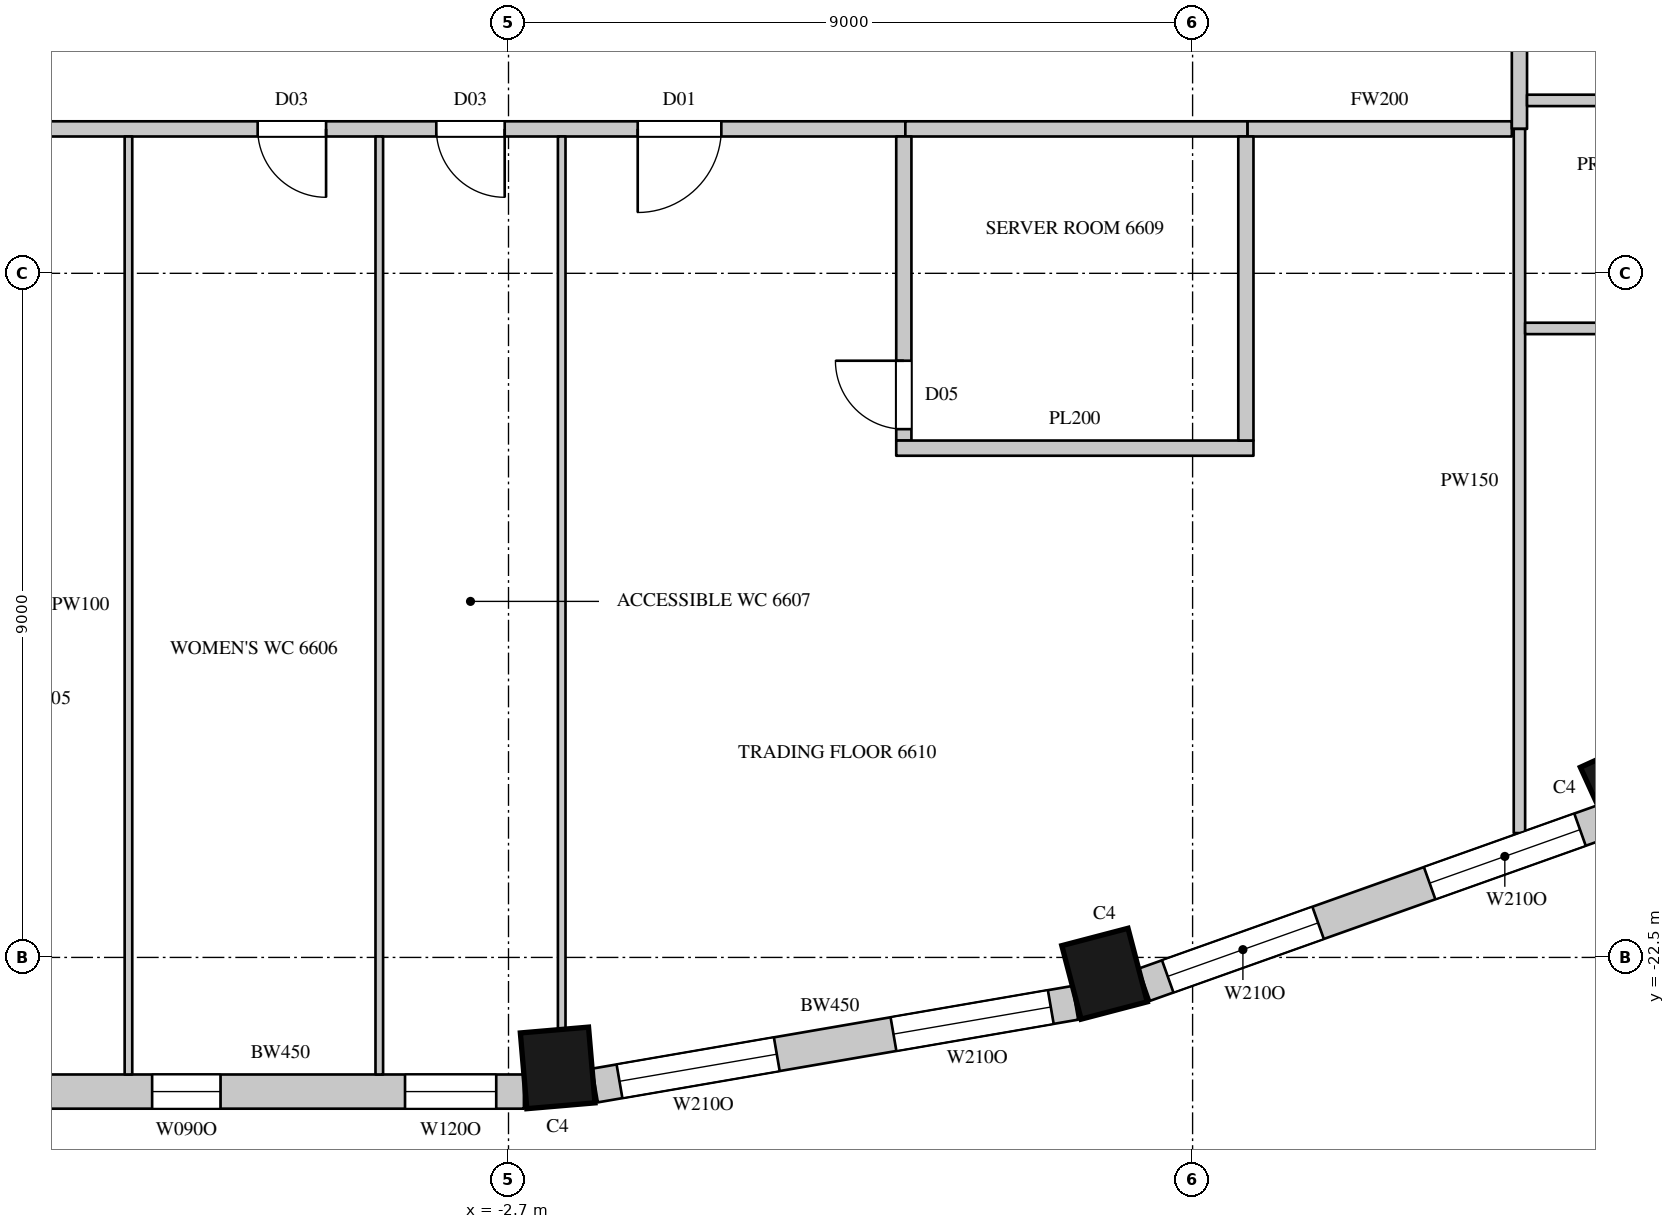
"""IFC4 building model, lengths in metres.
Left out: names, types, materials, properties, quantities, classifications, styles, units other than length and angle.
Written with IfcOpenShell. Run it as: python <this file> out.ifc"""

import sys

from ifc_helpers import new_model, si_unit, direction, frame, frame_2d, origin, origin_2d, place, context, subcontext, project, spatial, rectangle, extrude, element, fill, save


model = new_model("IFC4")
c1 = context("Model", 3, precision=1e-05, world=origin(), true_north=direction((0.0, 1.0)))
c2 = subcontext(c1, "Body", "Model", "MODEL_VIEW")
j1 = project(units=[si_unit("LENGTHUNIT", "METRE"), si_unit("PLANEANGLEUNIT", "RADIAN")], contexts=[c1])
p1 = place(None, origin())
s1 = spatial("IfcSite", under=j1, at=p1, CompositionType="ELEMENT")
p2 = place(p1, origin())
s2 = spatial("IfcBuilding", under=s1, at=p2, CompositionType="ELEMENT")
p3 = place(p2, frame((0.0, 0.0, 292.6)))
s3 = spatial("IfcBuildingStorey", under=s2, at=p3, CompositionType="ELEMENT", Elevation=292.6)
for number, where, z_axis, x_axis in (
    (1, (-2.053, -23.954, 0.0), (0.0, 0.0, 1.0), (0.996, 0.085, 0.0)),
    (2, (5.142, -22.715, 0.0), (0.0, 0.0, 1.0), (0.967, 0.253, 0.0)),
    (3, (12.019, -20.267, 0.0), (0.0, 0.0, 1.0), (0.91, 0.415, 0.0)),
):
    element("IfcColumn", number, at=place(p3, frame(where, z_axis=z_axis, x_axis=x_axis)), inside=s3, PredefinedType="COLUMN", context=c2, shape_type="SweptSolid", body=[
        extrude(rectangle(XDim=0.9, YDim=1.0, at=origin_2d()), origin(), (0.0, 0.0, 1.0), 4.1),
    ])
p4 = place(p3, frame((-8.903, -24.265, 0.0), z_axis=(0.0, 0.0, 1.0), x_axis=(1.0, 0.0, 0.0)))
e4 = element("IfcWall", 4, at=p4, inside=s3, PredefinedType="SOLIDWALL", context=c2, shape_type="SweptSolid", body=[
    extrude(rectangle(XDim=6.406, YDim=0.45, at=frame_2d((3.203, 0.0))), origin(), (0.0, 0.0, 1.0), 3.8),
])
p5 = place(p4, frame((1.514, 0.0, 1.05)))
e5 = element("IfcOpeningElement", 5, at=p5, cuts=e4, PredefinedType="OPENING", context=c2, shape_type="SweptSolid", body=[
    extrude(rectangle(XDim=0.9, YDim=2.4, at=frame_2d((0.45, 1.2))), frame((0.0, 0.235, 0.0), z_axis=(0.0, -1.0, 0.0), x_axis=(1.0, 0.0, 0.0)), (0.0, 0.0, 1.0), 0.47),
])
p6 = place(p4, frame((4.841, 0.0, 1.05)))
e6 = element("IfcOpeningElement", 6, at=p6, cuts=e4, PredefinedType="OPENING", context=c2, shape_type="SweptSolid", body=[
    extrude(rectangle(XDim=1.2, YDim=2.4, at=frame_2d((0.6, 1.2))), frame((0.0, 0.235, 0.0), z_axis=(0.0, -1.0, 0.0), x_axis=(1.0, 0.0, 0.0)), (0.0, 0.0, 1.0), 0.47),
])
p7 = place(p3, frame((-1.562, -24.185, 0.0), z_axis=(0.0, 0.0, 1.0), x_axis=(0.985502073964, 0.169663379113, 0.0)))
e7 = element("IfcWall", 7, at=p7, inside=s3, PredefinedType="SOLIDWALL", context=c2, shape_type="SweptSolid", body=[
    extrude(rectangle(XDim=6.412, YDim=0.45, at=frame_2d((3.206, 0.0))), origin(), (0.0, 0.0, 1.0), 3.8),
])
p8 = place(p7, frame((0.327, 0.0, 1.05)))
e8 = element("IfcOpeningElement", 8, at=p8, cuts=e7, PredefinedType="OPENING", context=c2, shape_type="SweptSolid", body=[
    extrude(rectangle(XDim=2.1, YDim=2.4, at=frame_2d((1.05, 1.2))), frame((0.0, 0.235, 0.0), z_axis=(0.0, -1.0, 0.0), x_axis=(1.0, 0.0, 0.0)), (0.0, 0.0, 1.0), 0.47),
])
p9 = place(p7, frame((3.985, 0.0, 1.05)))
e9 = element("IfcOpeningElement", 9, at=p9, cuts=e7, PredefinedType="OPENING", context=c2, shape_type="SweptSolid", body=[
    extrude(rectangle(XDim=2.1, YDim=2.4, at=frame_2d((1.05, 1.2))), frame((0.0, 0.235, 0.0), z_axis=(0.0, -1.0, 0.0), x_axis=(1.0, 0.0, 0.0)), (0.0, 0.0, 1.0), 0.47),
])
p10 = place(p3, frame((5.665, -22.859, 0.0), z_axis=(0.0, 0.0, 1.0), x_axis=(0.942108340262, 0.335308626803, 0.0)))
e10 = element("IfcWall", 10, at=p10, inside=s3, PredefinedType="SOLIDWALL", context=c2, shape_type="SweptSolid", body=[
    extrude(rectangle(XDim=6.412, YDim=0.45, at=frame_2d((3.206, 0.0))), origin(), (0.0, 0.0, 1.0), 3.8),
])
p11 = place(p10, frame((0.327, 0.0, 1.05)))
e11 = element("IfcOpeningElement", 11, at=p11, cuts=e10, PredefinedType="OPENING", context=c2, shape_type="SweptSolid", body=[
    extrude(rectangle(XDim=2.1, YDim=2.4, at=frame_2d((1.05, 1.2))), frame((0.0, 0.235, 0.0), z_axis=(0.0, -1.0, 0.0), x_axis=(1.0, 0.0, 0.0)), (0.0, 0.0, 1.0), 0.47),
])
p12 = place(p10, frame((3.985, 0.0, 1.05)))
e12 = element("IfcOpeningElement", 12, at=p12, cuts=e10, PredefinedType="OPENING", context=c2, shape_type="SweptSolid", body=[
    extrude(rectangle(XDim=2.1, YDim=2.4, at=frame_2d((1.05, 1.2))), frame((0.0, 0.235, 0.0), z_axis=(0.0, -1.0, 0.0), x_axis=(1.0, 0.0, 0.0)), (0.0, 0.0, 1.0), 0.47),
])
p13 = place(p3, frame((-10.9, -11.6, 0.0), z_axis=(0.0, 0.0, 1.0), x_axis=(1.0, 0.0, 0.0)))
e13 = element("IfcWall", 13, at=p13, inside=s3, PredefinedType="PARTITIONING", context=c2, shape_type="SweptSolid", body=[
    extrude(rectangle(XDim=13.421, YDim=0.2, at=frame_2d((6.71, 0.0))), origin(), (0.0, 0.0, 1.0), 3.8),
])
p14 = place(p13, frame((1.1, 0.0, 0.0)))
e14 = element("IfcOpeningElement", 14, at=p14, cuts=e13, PredefinedType="OPENING", context=c2, shape_type="SweptSolid", body=[
    extrude(rectangle(XDim=0.9, YDim=2.2, at=frame_2d((0.45, 1.1))), frame((0.0, 0.11, 0.0), z_axis=(0.0, -1.0, 0.0), x_axis=(1.0, 0.0, 0.0)), (0.0, 0.0, 1.0), 0.22),
])
p15 = place(p13, frame((4.9, 0.0, 0.0)))
e15 = element("IfcOpeningElement", 15, at=p15, cuts=e13, PredefinedType="OPENING", context=c2, shape_type="SweptSolid", body=[
    extrude(rectangle(XDim=0.9, YDim=2.2, at=frame_2d((0.45, 1.1))), frame((0.0, 0.11, 0.0), z_axis=(0.0, -1.0, 0.0), x_axis=(1.0, 0.0, 0.0)), (0.0, 0.0, 1.0), 0.22),
])
p16 = place(p13, frame((7.25, 0.0, 0.0)))
e16 = element("IfcOpeningElement", 16, at=p16, cuts=e13, PredefinedType="OPENING", context=c2, shape_type="SweptSolid", body=[
    extrude(rectangle(XDim=0.9, YDim=2.2, at=frame_2d((0.45, 1.1))), frame((0.0, 0.11, 0.0), z_axis=(0.0, -1.0, 0.0), x_axis=(1.0, 0.0, 0.0)), (0.0, 0.0, 1.0), 0.22),
])
p17 = place(p13, frame((9.9, 0.0, 0.0)))
e17 = element("IfcOpeningElement", 17, at=p17, cuts=e13, PredefinedType="OPENING", context=c2, shape_type="SweptSolid", body=[
    extrude(rectangle(XDim=1.1, YDim=2.4, at=frame_2d((0.55, 1.2))), frame((0.0, 0.11, 0.0), z_axis=(0.0, -1.0, 0.0), x_axis=(1.0, 0.0, 0.0)), (0.0, 0.0, 1.0), 0.22),
])
p18 = place(p3, frame((7.021, -11.6, 0.0), z_axis=(0.0, 0.0, 1.0), x_axis=(1.0, 0.0, 0.0)))
e18 = element("IfcWall", 18, at=p18, inside=s3, PredefinedType="PARTITIONING", context=c2, shape_type="SweptSolid", body=[
    extrude(rectangle(XDim=3.479, YDim=0.2, at=frame_2d((1.74, 0.0))), origin(), (0.0, 0.0, 1.0), 3.8),
])
p19 = place(p3, frame((10.6, -11.6, 0.0), z_axis=(0.0, 0.0, 1.0), x_axis=(0.0, 1.0, 0.0)))
e19 = element("IfcWall", 19, at=p19, inside=s3, PredefinedType="PARTITIONING", context=c2, shape_type="SweptSolid", body=[
    extrude(rectangle(XDim=23.7, YDim=0.2, at=frame_2d((11.85, 0.0))), origin(), (0.0, 0.0, 1.0), 3.8),
])
p20 = place(p19, frame((9.45, 0.0, 0.0)))
e20 = element("IfcOpeningElement", 20, at=p20, cuts=e19, PredefinedType="OPENING", context=c2, shape_type="SweptSolid", body=[
    extrude(rectangle(XDim=1.5, YDim=2.4, at=frame_2d((0.75, 1.2))), frame((0.0, 0.11, 0.0), z_axis=(0.0, -1.0, 0.0), x_axis=(1.0, 0.0, 0.0)), (0.0, 0.0, 1.0), 0.22),
])
p21 = place(p19, frame((19.45, 0.0, 0.0)))
e21 = element("IfcOpeningElement", 21, at=p21, cuts=e19, PredefinedType="OPENING", context=c2, shape_type="SweptSolid", body=[
    extrude(rectangle(XDim=1.1, YDim=2.4, at=frame_2d((0.55, 1.2))), frame((0.0, 0.11, 0.0), z_axis=(0.0, -1.0, 0.0), x_axis=(1.0, 0.0, 0.0)), (0.0, 0.0, 1.0), 0.22),
])
p22 = place(p19, frame((4.6, 0.0, 0.0)))
e22 = element("IfcOpeningElement", 22, at=p22, cuts=e19, PredefinedType="OPENING", context=c2, shape_type="SweptSolid", body=[
    extrude(rectangle(XDim=1.1, YDim=2.4, at=frame_2d((0.55, 1.2))), frame((0.0, 0.11, 0.0), z_axis=(0.0, -1.0, 0.0), x_axis=(1.0, 0.0, 0.0)), (0.0, 0.0, 1.0), 0.22),
])
p23 = place(p3, frame((10.6, -20.864, 0.0), z_axis=(0.0, 0.0, 1.0), x_axis=(0.0, 1.0, 0.0)))
e23 = element("IfcWall", 23, at=p23, inside=s3, PredefinedType="PARTITIONING", context=c2, shape_type="SweptSolid", body=[
    extrude(rectangle(XDim=9.264, YDim=0.15, at=frame_2d((4.632, 0.0))), origin(), (0.0, 0.0, 1.0), 3.8),
])
p24 = place(p3, frame((10.675, -14.225, 0.0), z_axis=(0.0, 0.0, 1.0), x_axis=(1.0, 0.0, 0.0)))
e24 = element("IfcWall", 24, at=p24, inside=s3, PredefinedType="PARTITIONING", context=c2, shape_type="SweptSolid", body=[
    extrude(rectangle(XDim=3.6, YDim=0.15, at=frame_2d((1.8, 0.0))), origin(), (0.0, 0.0, 1.0), 3.8),
])
p25 = place(p24, frame((1.3, 0.0, 0.0)))
e25 = element("IfcOpeningElement", 25, at=p25, cuts=e24, PredefinedType="OPENING", context=c2, shape_type="SweptSolid", body=[
    extrude(rectangle(XDim=0.9, YDim=2.2, at=frame_2d((0.45, 1.1))), frame((0.0, 0.085, 0.0), z_axis=(0.0, -1.0, 0.0), x_axis=(1.0, 0.0, 0.0)), (0.0, 0.0, 1.0), 0.17),
])
p26 = place(p3, frame((10.7, -11.225, 0.0), z_axis=(0.0, 0.0, 1.0), x_axis=(1.0, 0.0, 0.0)))
e26 = element("IfcWall", 26, at=p26, inside=s3, PredefinedType="PARTITIONING", context=c2, shape_type="SweptSolid", body=[
    extrude(rectangle(XDim=3.425, YDim=0.15, at=frame_2d((1.712, 0.0))), origin(), (0.0, 0.0, 1.0), 3.8),
])
p27 = place(p3, frame((2.521, -11.6, 0.0), z_axis=(0.0, 0.0, 1.0), x_axis=(1.0, 0.0, 0.0)))
e27 = element("IfcWall", 27, at=p27, inside=s3, PredefinedType="PARTITIONING", context=c2, shape_type="SweptSolid", body=[
    extrude(rectangle(XDim=4.5, YDim=0.2, at=frame_2d((2.25, 0.0))), origin(), (0.0, 0.0, 1.0), 3.8),
])
p28 = place(p3, frame((2.501, -15.7, 0.0), z_axis=(0.0, 0.0, 1.0), x_axis=(0.0, 1.0, 0.0)))
e28 = element("IfcWall", 28, at=p28, inside=s3, PredefinedType="PARTITIONING", context=c2, shape_type="SweptSolid", body=[
    extrude(rectangle(XDim=4.0, YDim=0.2, at=frame_2d((2.0, 0.0))), origin(), (0.0, 0.0, 1.0), 3.8),
])
p29 = place(p28, frame((0.15, 0.0, 0.0)))
e29 = element("IfcOpeningElement", 29, at=p29, cuts=e28, PredefinedType="OPENING", context=c2, shape_type="SweptSolid", body=[
    extrude(rectangle(XDim=0.9, YDim=2.2, at=frame_2d((0.45, 1.1))), frame((0.0, 0.11, 0.0), z_axis=(0.0, -1.0, 0.0), x_axis=(1.0, 0.0, 0.0)), (0.0, 0.0, 1.0), 0.22),
])
p30 = place(p3, frame((2.401, -15.8, 0.0), z_axis=(0.0, 0.0, 1.0), x_axis=(1.0, 0.0, 0.0)))
e30 = element("IfcWall", 30, at=p30, inside=s3, PredefinedType="PARTITIONING", context=c2, shape_type="SweptSolid", body=[
    extrude(rectangle(XDim=4.7, YDim=0.2, at=frame_2d((2.35, 0.0))), origin(), (0.0, 0.0, 1.0), 3.8),
])
p31 = place(p3, frame((7.001, -15.7, 0.0), z_axis=(0.0, 0.0, 1.0), x_axis=(0.0, 1.0, 0.0)))
e31 = element("IfcWall", 31, at=p31, inside=s3, PredefinedType="PARTITIONING", context=c2, shape_type="SweptSolid", body=[
    extrude(rectangle(XDim=4.0, YDim=0.2, at=frame_2d((2.0, 0.0))), origin(), (0.0, 0.0, 1.0), 3.8),
])
for number, where, z_axis, x_axis in (
    (32, (-7.7, -24.04, 0.0), (0.0, 0.0, 1.0), (0.0, 1.0, 0.0)),
    (33, (-4.4, -24.04, 0.0), (0.0, 0.0, 1.0), (0.0, 1.0, 0.0)),
):
    element("IfcWall", number, at=place(p3, frame(where, z_axis=z_axis, x_axis=x_axis)), inside=s3, PredefinedType="PARTITIONING", context=c2, shape_type="SweptSolid", body=[
        extrude(rectangle(XDim=12.34, YDim=0.1, at=frame_2d((6.17, 0.0))), origin(), (0.0, 0.0, 1.0), 3.8),
    ])
p32 = place(p3, frame((-2.0, -23.447, 0.0), z_axis=(0.0, 0.0, 1.0), x_axis=(0.0, 1.0, 0.0)))
e34 = element("IfcWall", 34, at=p32, inside=s3, PredefinedType="PARTITIONING", context=c2, shape_type="SweptSolid", body=[
    extrude(rectangle(XDim=11.747, YDim=0.1, at=frame_2d((5.874, 0.0))), origin(), (0.0, 0.0, 1.0), 3.8),
])
p33 = place(p8, origin())
e35 = element("IfcWindow", 35, at=p33, inside=s3, PartitioningType="SINGLE_PANEL", PredefinedType="WINDOW", context=c2, shape_type="SweptSolid", body=[
    extrude(rectangle(XDim=2.1, YDim=2.4, at=frame_2d((1.05, 1.2))), frame((0.0, 0.135, 0.0), z_axis=(0.0, -1.0, 0.0), x_axis=(1.0, 0.0, 0.0)), (0.0, 0.0, 1.0), 0.06),
])
fill(e8, e35)
p34 = place(p9, origin())
e36 = element("IfcWindow", 36, at=p34, inside=s3, PartitioningType="SINGLE_PANEL", PredefinedType="WINDOW", context=c2, shape_type="SweptSolid", body=[
    extrude(rectangle(XDim=2.1, YDim=2.4, at=frame_2d((1.05, 1.2))), frame((0.0, 0.135, 0.0), z_axis=(0.0, -1.0, 0.0), x_axis=(1.0, 0.0, 0.0)), (0.0, 0.0, 1.0), 0.06),
])
fill(e9, e36)
p35 = place(p11, origin())
e37 = element("IfcWindow", 37, at=p35, inside=s3, PartitioningType="SINGLE_PANEL", PredefinedType="WINDOW", context=c2, shape_type="SweptSolid", body=[
    extrude(rectangle(XDim=2.1, YDim=2.4, at=frame_2d((1.05, 1.2))), frame((0.0, 0.135, 0.0), z_axis=(0.0, -1.0, 0.0), x_axis=(1.0, 0.0, 0.0)), (0.0, 0.0, 1.0), 0.06),
])
fill(e11, e37)
p36 = place(p12, origin())
e38 = element("IfcWindow", 38, at=p36, inside=s3, PartitioningType="SINGLE_PANEL", PredefinedType="WINDOW", context=c2, shape_type="SweptSolid", body=[
    extrude(rectangle(XDim=2.1, YDim=2.4, at=frame_2d((1.05, 1.2))), frame((0.0, 0.135, 0.0), z_axis=(0.0, -1.0, 0.0), x_axis=(1.0, 0.0, 0.0)), (0.0, 0.0, 1.0), 0.06),
])
fill(e12, e38)
p37 = place(p15, origin())
e39 = element("IfcDoor", 39, at=p37, inside=s3, OperationType="SINGLE_SWING_LEFT", PredefinedType="DOOR", context=c2, shape_type="SweptSolid", body=[
    extrude(rectangle(XDim=0.9, YDim=2.2, at=frame_2d((0.45, 1.1))), frame((0.0, 0.025, 0.0), z_axis=(0.0, -1.0, 0.0), x_axis=(1.0, 0.0, 0.0)), (0.0, 0.0, 1.0), 0.05),
])
fill(e15, e39)
p38 = place(p16, origin())
e40 = element("IfcDoor", 40, at=p38, inside=s3, OperationType="SINGLE_SWING_LEFT", PredefinedType="DOOR", context=c2, shape_type="SweptSolid", body=[
    extrude(rectangle(XDim=0.9, YDim=2.2, at=frame_2d((0.45, 1.1))), frame((0.0, 0.025, 0.0), z_axis=(0.0, -1.0, 0.0), x_axis=(1.0, 0.0, 0.0)), (0.0, 0.0, 1.0), 0.05),
])
fill(e16, e40)
p39 = place(p17, origin())
e41 = element("IfcDoor", 41, at=p39, inside=s3, OperationType="SINGLE_SWING_RIGHT", PredefinedType="DOOR", context=c2, shape_type="SweptSolid", body=[
    extrude(rectangle(XDim=1.1, YDim=2.4, at=frame_2d((0.55, 1.2))), frame((0.0, 0.025, 0.0), z_axis=(0.0, -1.0, 0.0), x_axis=(1.0, 0.0, 0.0)), (0.0, 0.0, 1.0), 0.05),
])
fill(e17, e41)
p40 = place(p29, origin())
e42 = element("IfcDoor", 42, at=p40, inside=s3, OperationType="SINGLE_SWING_RIGHT", PredefinedType="DOOR", context=c2, shape_type="SweptSolid", body=[
    extrude(rectangle(XDim=0.9, YDim=2.2, at=frame_2d((0.45, 1.1))), frame((0.0, 0.025, 0.0), z_axis=(0.0, -1.0, 0.0), x_axis=(1.0, 0.0, 0.0)), (0.0, 0.0, 1.0), 0.05),
])
fill(e29, e42)
p41 = place(p5, origin())
e43 = element("IfcWindow", 43, at=p41, inside=s3, PartitioningType="SINGLE_PANEL", PredefinedType="WINDOW", context=c2, shape_type="SweptSolid", body=[
    extrude(rectangle(XDim=0.9, YDim=2.4, at=frame_2d((0.45, 1.2))), frame((0.0, 0.135, 0.0), z_axis=(0.0, -1.0, 0.0), x_axis=(1.0, 0.0, 0.0)), (0.0, 0.0, 1.0), 0.06),
])
fill(e5, e43)
p42 = place(p6, origin())
e44 = element("IfcWindow", 44, at=p42, inside=s3, PartitioningType="SINGLE_PANEL", PredefinedType="WINDOW", context=c2, shape_type="SweptSolid", body=[
    extrude(rectangle(XDim=1.2, YDim=2.4, at=frame_2d((0.6, 1.2))), frame((0.0, 0.135, 0.0), z_axis=(0.0, -1.0, 0.0), x_axis=(1.0, 0.0, 0.0)), (0.0, 0.0, 1.0), 0.06),
])
fill(e6, e44)
save(model, sys.argv[1])
